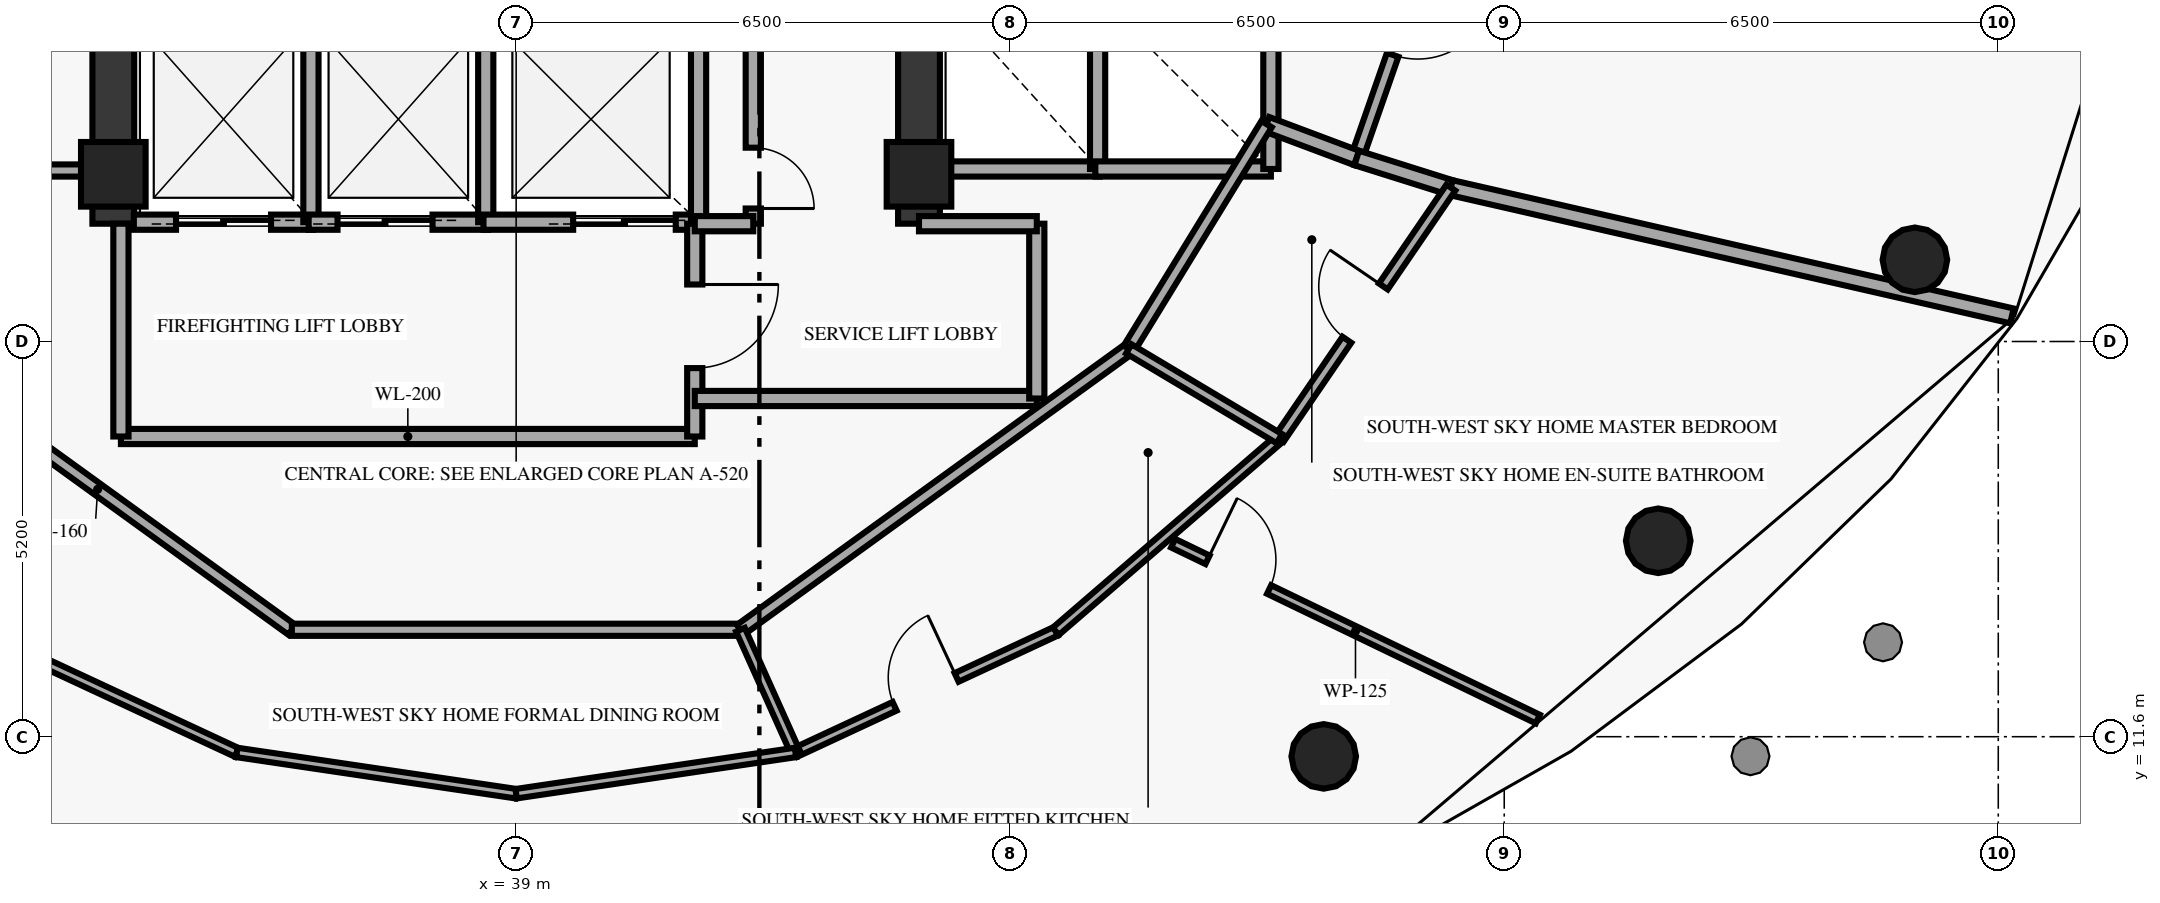
"""IFC4 building model, lengths in metres.
Left out: names, types, materials, properties, quantities, classifications, styles, units other than length and angle.
Written with IfcOpenShell. Run it as: python <this file> out.ifc"""

import sys

from ifc_helpers import new_model, si_unit, direction, frame, frame_2d, origin, origin_2d, place, context, subcontext, project, spatial, rectangle, circle, extrude, element, fill, save


model = new_model("IFC4")
c1 = context("Model", 3, precision=1e-05, world=origin(), true_north=direction((0.0, 1.0)))
c2 = subcontext(c1, "Body", "Model", "MODEL_VIEW")
j1 = project(units=[si_unit("LENGTHUNIT", "METRE"), si_unit("PLANEANGLEUNIT", "RADIAN")], contexts=[c1])
p1 = place(None, origin())
s1 = spatial("IfcSite", under=j1, at=p1, CompositionType="ELEMENT")
p2 = place(p1, origin())
s2 = spatial("IfcBuilding", under=s1, at=p2, CompositionType="ELEMENT")
p3 = place(p2, frame((0.0, 0.0, 208.15)))
s3 = spatial("IfcBuildingStorey", under=s2, at=p3, CompositionType="ELEMENT", Elevation=208.15)
for number, where, z_axis, x_axis in (
    (1, (33.7, 19.0, 0.0), (0.0, 0.0, 1.0), (1.0, 0.0, 0.0)),
    (2, (44.3, 19.0, 0.0), (0.0, 0.0, 1.0), (1.0, 0.0, 0.0)),
):
    element("IfcColumn", number, at=place(p3, frame(where, z_axis=z_axis, x_axis=x_axis)), inside=s3, PredefinedType="PILASTER", context=c2, shape_type="SweptSolid", body=[
        extrude(rectangle(XDim=0.85, YDim=0.85, at=origin_2d()), origin(), (0.0, 0.0, 1.0), 3.41),
    ])
for number, where, z_axis, x_axis in (
    (3, (49.625, 11.341, 0.0), (0.0, 0.0, 1.0), (1.0, 0.0, 0.0)),
    (4, (54.026, 14.178, 0.0), (0.0, 0.0, 1.0), (1.0, 0.0, 0.0)),
    (5, (57.403, 17.875, 0.0), (0.0, 0.0, 1.0), (1.0, 0.0, 0.0)),
):
    element("IfcColumn", number, at=place(p3, frame(where, z_axis=z_axis, x_axis=x_axis)), inside=s3, PredefinedType="COLUMN", context=c2, shape_type="SweptSolid", body=[
        extrude(circle(Radius=0.425, at=origin_2d()), origin(), (0.0, 0.0, 1.0), 3.41),
    ])
for number, where, z_axis, x_axis in (
    (6, (33.7, 18.35, 0.0), (0.0, 0.0, 1.0), (0.0, 1.0, 0.0)),
    (7, (44.3, 18.35, 0.0), (0.0, 0.0, 1.0), (0.0, 1.0, 0.0)),
):
    element("IfcWall", number, at=place(p3, frame(where, z_axis=z_axis, x_axis=x_axis)), inside=s3, PredefinedType="SHEAR", context=c2, shape_type="SweptSolid", body=[
        extrude(rectangle(XDim=2.95, YDim=0.55, at=frame_2d((1.475, 0.0))), origin(), (0.0, 0.0, 1.0), 3.41),
    ])
p4 = place(p3, frame((44.57, 19.07, 0.0), z_axis=(0.0, 0.0, 1.0), x_axis=(1.0, 0.0, 0.0)))
e8 = element("IfcWall", 8, at=p4, inside=s3, PredefinedType="SOLIDWALL", context=c2, shape_type="SweptSolid", body=[
    extrude(rectangle(XDim=2.11, YDim=0.2, at=frame_2d((1.055, 0.0))), origin(), (0.0, 0.0, 1.0), 3.41),
])
for number, where, z_axis, x_axis in (
    (9, (46.65, 19.07, 0.0), (0.0, 0.0, 1.0), (0.0, 1.0, 0.0)),
    (10, (46.62, 19.07, 0.0), (0.0, 0.0, 1.0), (1.0, 0.0, 0.0)),
    (11, (48.93, 19.07, 0.0), (0.0, 0.0, 1.0), (0.0, 1.0, 0.0)),
):
    element("IfcWall", number, at=place(p3, frame(where, z_axis=z_axis, x_axis=x_axis)), inside=s3, PredefinedType="SOLIDWALL", context=c2, shape_type="SweptSolid", body=[
        extrude(rectangle(XDim=2.31, YDim=0.2, at=frame_2d((1.155, 0.0))), origin(), (0.0, 0.0, 1.0), 3.41),
    ])
p5 = place(p3, frame((33.97, 18.37, 0.0), z_axis=(0.0, 0.0, 1.0), x_axis=(1.0, 0.0, 0.0)))
e12 = element("IfcWall", 12, at=p5, inside=s3, PredefinedType="SOLIDWALL", context=c2, shape_type="SweptSolid", body=[
    extrude(rectangle(XDim=2.36, YDim=0.2, at=frame_2d((1.18, 0.0))), origin(), (0.0, 0.0, 1.0), 3.41),
])
p6 = place(p5, frame((0.555, 0.0, 0.0)))
e13 = element("IfcOpeningElement", 13, at=p6, cuts=e12, PredefinedType="OPENING", context=c2, shape_type="SweptSolid", body=[
    extrude(rectangle(XDim=1.25, YDim=2.2, at=frame_2d((0.625, 1.1))), frame((0.0, 0.11, 0.0), z_axis=(0.0, -1.0, 0.0), x_axis=(1.0, 0.0, 0.0)), (0.0, 0.0, 1.0), 0.22),
])
p7 = place(p3, frame((36.3, 18.37, 0.0), z_axis=(0.0, 0.0, 1.0), x_axis=(0.0, 1.0, 0.0)))
e14 = element("IfcWall", 14, at=p7, inside=s3, PredefinedType="SOLIDWALL", context=c2, shape_type="SweptSolid", body=[
    extrude(rectangle(XDim=2.71, YDim=0.2, at=frame_2d((1.355, 0.0))), origin(), (0.0, 0.0, 1.0), 3.41),
])
p8 = place(p3, frame((36.27, 18.37, 0.0), z_axis=(0.0, 0.0, 1.0), x_axis=(1.0, 0.0, 0.0)))
e15 = element("IfcWall", 15, at=p8, inside=s3, PredefinedType="SOLIDWALL", context=c2, shape_type="SweptSolid", body=[
    extrude(rectangle(XDim=2.36, YDim=0.2, at=frame_2d((1.18, 0.0))), origin(), (0.0, 0.0, 1.0), 3.41),
])
p9 = place(p8, frame((0.38, 0.0, 0.0)))
e16 = element("IfcOpeningElement", 16, at=p9, cuts=e15, PredefinedType="OPENING", context=c2, shape_type="SweptSolid", body=[
    extrude(rectangle(XDim=1.25, YDim=2.2, at=frame_2d((0.625, 1.1))), frame((0.0, 0.11, 0.0), z_axis=(0.0, -1.0, 0.0), x_axis=(1.0, 0.0, 0.0)), (0.0, 0.0, 1.0), 0.22),
])
p10 = place(p3, frame((38.6, 18.37, 0.0), z_axis=(0.0, 0.0, 1.0), x_axis=(0.0, 1.0, 0.0)))
e17 = element("IfcWall", 17, at=p10, inside=s3, PredefinedType="SOLIDWALL", context=c2, shape_type="SweptSolid", body=[
    extrude(rectangle(XDim=2.71, YDim=0.2, at=frame_2d((1.355, 0.0))), origin(), (0.0, 0.0, 1.0), 3.41),
])
p11 = place(p3, frame((38.57, 18.37, 0.0), z_axis=(0.0, 0.0, 1.0), x_axis=(1.0, 0.0, 0.0)))
e18 = element("IfcWall", 18, at=p11, inside=s3, PredefinedType="SOLIDWALL", context=c2, shape_type="SweptSolid", body=[
    extrude(rectangle(XDim=2.83, YDim=0.2, at=frame_2d((1.415, 0.0))), origin(), (0.0, 0.0, 1.0), 3.41),
])
p12 = place(p11, frame((1.18, 0.0, 0.0)))
e19 = element("IfcOpeningElement", 19, at=p12, cuts=e18, PredefinedType="OPENING", context=c2, shape_type="SweptSolid", body=[
    extrude(rectangle(XDim=1.35, YDim=2.18, at=frame_2d((0.675, 1.09))), frame((0.0, 0.11, 0.0), z_axis=(0.0, -1.0, 0.0), x_axis=(1.0, 0.0, 0.0)), (0.0, 0.0, 1.0), 0.22),
])
p13 = place(p3, frame((41.4, 18.37, 0.0), z_axis=(0.0, 0.0, 1.0), x_axis=(0.0, 1.0, 0.0)))
e20 = element("IfcWall", 20, at=p13, inside=s3, PredefinedType="SOLIDWALL", context=c2, shape_type="SweptSolid", body=[
    extrude(rectangle(XDim=2.71, YDim=0.2, at=frame_2d((1.355, 0.0))), origin(), (0.0, 0.0, 1.0), 3.41),
])
p14 = place(p3, frame((29.05, 19.05, 0.0), z_axis=(0.0, 0.0, 1.0), x_axis=(1.0, 0.0, 0.0)))
e21 = element("IfcWall", 21, at=p14, inside=s3, PredefinedType="PARTITIONING", context=c2, shape_type="SweptSolid", body=[
    extrude(rectangle(XDim=4.65, YDim=0.16, at=frame_2d((2.325, 0.0))), origin(), (0.0, 0.0, 1.0), 3.41),
])
p15 = place(p3, frame((33.8, 15.55, 0.0), z_axis=(0.0, 0.0, 1.0), x_axis=(1.0, 0.0, 0.0)))
e22 = element("IfcWall", 22, at=p15, inside=s3, PredefinedType="SOLIDWALL", context=c2, shape_type="SweptSolid", body=[
    extrude(rectangle(XDim=7.55, YDim=0.2, at=frame_2d((3.775, 0.0))), origin(), (0.0, 0.0, 1.0), 3.41),
])
p16 = place(p3, frame((33.8, 15.55, 0.0), z_axis=(0.0, 0.0, 1.0), x_axis=(0.0, 1.0, 0.0)))
e23 = element("IfcWall", 23, at=p16, inside=s3, PredefinedType="SOLIDWALL", context=c2, shape_type="SweptSolid", body=[
    extrude(rectangle(XDim=2.8, YDim=0.2, at=frame_2d((1.4, 0.0))), origin(), (0.0, 0.0, 1.0), 3.41),
])
p17 = place(p3, frame((41.35, 15.55, 0.0), z_axis=(0.0, 0.0, 1.0), x_axis=(0.0, 1.0, 0.0)))
e24 = element("IfcWall", 24, at=p17, inside=s3, PredefinedType="SOLIDWALL", context=c2, shape_type="SweptSolid", body=[
    extrude(rectangle(XDim=2.8, YDim=0.2, at=frame_2d((1.4, 0.0))), origin(), (0.0, 0.0, 1.0), 3.41),
])
p18 = place(p17, frame((0.9, 0.0, 0.0)))
e25 = element("IfcOpeningElement", 25, at=p18, cuts=e24, PredefinedType="OPENING", context=c2, shape_type="SweptSolid", body=[
    extrude(rectangle(XDim=1.1, YDim=2.15, at=frame_2d((0.55, 1.075))), frame((0.0, 0.11, 0.0), z_axis=(0.0, -1.0, 0.0), x_axis=(1.0, 0.0, 0.0)), (0.0, 0.0, 1.0), 0.22),
])
p19 = place(p3, frame((41.35, 16.05, 0.0), z_axis=(0.0, 0.0, 1.0), x_axis=(1.0, 0.0, 0.0)))
e26 = element("IfcWall", 26, at=p19, inside=s3, PredefinedType="SOLIDWALL", context=c2, shape_type="SweptSolid", body=[
    extrude(rectangle(XDim=4.5, YDim=0.2, at=frame_2d((2.25, 0.0))), origin(), (0.0, 0.0, 1.0), 3.41),
])
p20 = place(p3, frame((45.85, 16.05, 0.0), z_axis=(0.0, 0.0, 1.0), x_axis=(0.0, 1.0, 0.0)))
e27 = element("IfcWall", 27, at=p20, inside=s3, PredefinedType="SOLIDWALL", context=c2, shape_type="SweptSolid", body=[
    extrude(rectangle(XDim=2.3, YDim=0.2, at=frame_2d((1.15, 0.0))), origin(), (0.0, 0.0, 1.0), 3.41),
])
p21 = place(p3, frame((44.3, 18.35, 0.0), z_axis=(0.0, 0.0, 1.0), x_axis=(1.0, 0.0, 0.0)))
e28 = element("IfcWall", 28, at=p21, inside=s3, PredefinedType="SOLIDWALL", context=c2, shape_type="SweptSolid", body=[
    extrude(rectangle(XDim=1.55, YDim=0.2, at=frame_2d((0.775, 0.0))), origin(), (0.0, 0.0, 1.0), 3.41),
])
p22 = place(p3, frame((42.12, 18.35, 0.0), z_axis=(0.0, 0.0, 1.0), x_axis=(0.0, 1.0, 0.0)))
e29 = element("IfcWall", 29, at=p22, inside=s3, PredefinedType="SOLIDWALL", context=c2, shape_type="SweptSolid", body=[
    extrude(rectangle(XDim=2.95, YDim=0.2, at=frame_2d((1.475, 0.0))), origin(), (0.0, 0.0, 1.0), 3.41),
])
p23 = place(p22, frame((0.2, 0.0, 0.0)))
e30 = element("IfcOpeningElement", 30, at=p23, cuts=e29, PredefinedType="OPENING", context=c2, shape_type="SweptSolid", body=[
    extrude(rectangle(XDim=0.8, YDim=2.05, at=frame_2d((0.4, 1.025))), frame((0.0, 0.11, 0.0), z_axis=(0.0, -1.0, 0.0), x_axis=(1.0, 0.0, 0.0)), (0.0, 0.0, 1.0), 0.22),
])
p24 = place(p3, frame((41.35, 18.35, 0.0), z_axis=(0.0, 0.0, 1.0), x_axis=(1.0, 0.0, 0.0)))
e31 = element("IfcWall", 31, at=p24, inside=s3, PredefinedType="SOLIDWALL", context=c2, shape_type="SweptSolid", body=[
    extrude(rectangle(XDim=0.77, YDim=0.2, at=frame_2d((0.385, 0.0))), origin(), (0.0, 0.0, 1.0), 3.41),
])
p25 = place(p3, frame((51.335, 22.874, 0.0), z_axis=(0.0, 0.0, 1.0), x_axis=(-0.32925850992, -0.944239817867, 0.0)))
e32 = element("IfcWall", 32, at=p25, inside=s3, PredefinedType="PARTITIONING", context=c2, shape_type="SweptSolid", body=[
    extrude(rectangle(XDim=3.875, YDim=0.16, at=frame_2d((1.938, 0.0))), origin(), (0.0, 0.0, 1.0), 3.41),
])
p26 = place(p25, frame((1.438, 0.0, 0.0)))
e33 = element("IfcOpeningElement", 33, at=p26, cuts=e32, PredefinedType="OPENING", context=c2, shape_type="SweptSolid", body=[
    extrude(rectangle(XDim=1.0, YDim=2.15, at=frame_2d((0.5, 1.075))), frame((0.0, 0.09, 0.0), z_axis=(0.0, -1.0, 0.0), x_axis=(1.0, 0.0, 0.0)), (0.0, 0.0, 1.0), 0.18),
])
p27 = place(p3, frame((48.873, 19.66, 0.0), z_axis=(0.0, 0.0, 1.0), x_axis=(0.93631333527, -0.351165684821, 0.0)))
e34 = element("IfcWall", 34, at=p27, inside=s3, PredefinedType="PARTITIONING", context=c2, shape_type="SweptSolid", body=[
    extrude(rectangle(XDim=1.267, YDim=0.2, at=frame_2d((0.633, 0.0))), origin(), (0.0, 0.0, 1.0), 3.41),
])
p28 = place(p3, frame((50.059, 19.215, 0.0), z_axis=(0.0, 0.0, 1.0), x_axis=(0.953832301714, -0.300339708008, 0.0)))
e35 = element("IfcWall", 35, at=p28, inside=s3, PredefinedType="PARTITIONING", context=c2, shape_type="SweptSolid", body=[
    extrude(rectangle(XDim=1.299, YDim=0.2, at=frame_2d((0.649, 0.0))), origin(), (0.0, 0.0, 1.0), 3.41),
])
p29 = place(p3, frame((51.298, 18.825, 0.0), z_axis=(0.0, 0.0, 1.0), x_axis=(0.97483809237, -0.222914094809, 0.0)))
e36 = element("IfcWall", 36, at=p29, inside=s3, PredefinedType="PARTITIONING", context=c2, shape_type="SweptSolid", body=[
    extrude(rectangle(XDim=7.572, YDim=0.2, at=frame_2d((3.786, 0.0))), origin(), (0.0, 0.0, 1.0), 3.41),
])
p30 = place(p3, frame((30.939, 16.703, 0.0), z_axis=(0.0, 0.0, 1.0), x_axis=(0.810290119061, -0.586028943784, 0.0)))
e37 = element("IfcWall", 37, at=p30, inside=s3, PredefinedType="PARTITIONING", context=c2, shape_type="SweptSolid", body=[
    extrude(rectangle(XDim=6.306, YDim=0.16, at=frame_2d((3.153, 0.0))), origin(), (0.0, 0.0, 1.0), 3.41),
])
p31 = place(p3, frame((36.049, 13.007, 0.0), z_axis=(0.0, 0.0, 1.0), x_axis=(1.0, 0.0, 0.0)))
e38 = element("IfcWall", 38, at=p31, inside=s3, PredefinedType="PARTITIONING", context=c2, shape_type="SweptSolid", body=[
    extrude(rectangle(XDim=5.902, YDim=0.16, at=frame_2d((2.951, 0.0))), origin(), (0.0, 0.0, 1.0), 3.41),
])
p32 = place(p3, frame((41.951, 13.007, 0.0), z_axis=(0.0, 0.0, 1.0), x_axis=(0.810290119061, 0.586028943784, 0.0)))
e39 = element("IfcWall", 39, at=p32, inside=s3, PredefinedType="PARTITIONING", context=c2, shape_type="SweptSolid", body=[
    extrude(rectangle(XDim=6.306, YDim=0.16, at=frame_2d((3.153, 0.0))), origin(), (0.0, 0.0, 1.0), 3.41),
])
p33 = place(p3, frame((47.061, 16.703, 0.0), z_axis=(0.0, 0.0, 1.0), x_axis=(0.522486120877, 0.852647789823, 0.0)))
e40 = element("IfcWall", 40, at=p33, inside=s3, PredefinedType="PARTITIONING", context=c2, shape_type="SweptSolid", body=[
    extrude(rectangle(XDim=3.468, YDim=0.16, at=frame_2d((1.734, 0.0))), origin(), (0.0, 0.0, 1.0), 3.41),
])
p34 = place(p3, frame((46.1, 12.987, 0.0), z_axis=(0.0, 0.0, 1.0), x_axis=(-0.906625113427, -0.421937085007, 0.0)))
e41 = element("IfcWall", 41, at=p34, inside=s3, PredefinedType="PARTITIONING", context=c2, shape_type="SweptSolid", body=[
    extrude(rectangle(XDim=3.778, YDim=0.125, at=frame_2d((1.889, 0.0))), origin(), (0.0, 0.0, 1.0), 3.41),
])
p35 = place(p34, frame((1.439, 0.0, 0.0)))
e42 = element("IfcOpeningElement", 42, at=p35, cuts=e41, PredefinedType="OPENING", context=c2, shape_type="SweptSolid", body=[
    extrude(rectangle(XDim=0.9, YDim=2.1, at=frame_2d((0.45, 1.05))), frame((0.0, 0.073, 0.0), z_axis=(0.0, -1.0, 0.0), x_axis=(1.0, 0.0, 0.0)), (0.0, 0.0, 1.0), 0.145),
])
p36 = place(p3, frame((46.1, 12.987, 0.0), z_axis=(0.0, 0.0, 1.0), x_axis=(0.757456069071, 0.652886133585, 0.0)))
e43 = element("IfcWall", 43, at=p36, inside=s3, PredefinedType="PARTITIONING", context=c2, shape_type="SweptSolid", body=[
    extrude(rectangle(XDim=3.883, YDim=0.125, at=frame_2d((1.941, 0.0))), origin(), (0.0, 0.0, 1.0), 3.41),
])
p37 = place(p3, frame((51.298, 18.825, 0.0), z_axis=(0.0, 0.0, 1.0), x_axis=(-0.56419813198, -0.825639429697, 0.0)))
e44 = element("IfcWall", 44, at=p37, inside=s3, PredefinedType="PARTITIONING", context=c2, shape_type="SweptSolid", body=[
    extrude(rectangle(XDim=4.0, YDim=0.14, at=frame_2d((2.0, 0.0))), origin(), (0.0, 0.0, 1.0), 3.41),
])
p38 = place(p37, frame((1.575, 0.0, 0.0)))
e45 = element("IfcOpeningElement", 45, at=p38, cuts=e44, PredefinedType="OPENING", context=c2, shape_type="SweptSolid", body=[
    extrude(rectangle(XDim=0.85, YDim=2.1, at=frame_2d((0.425, 1.05))), frame((0.0, 0.08, 0.0), z_axis=(0.0, -1.0, 0.0), x_axis=(1.0, 0.0, 0.0)), (0.0, 0.0, 1.0), 0.16),
])
p39 = place(p3, frame((41.951, 13.007, 0.0), z_axis=(0.0, 0.0, 1.0), x_axis=(0.409337233456, -0.912383159263, 0.0)))
e46 = element("IfcWall", 46, at=p39, inside=s3, PredefinedType="PARTITIONING", context=c2, shape_type="SweptSolid", body=[
    extrude(rectangle(XDim=1.769, YDim=0.125, at=frame_2d((0.885, 0.0))), origin(), (0.0, 0.0, 1.0), 3.41),
])
p40 = place(p3, frame((47.061, 16.703, 0.0), z_axis=(0.0, 0.0, 1.0), x_axis=(0.858844842863, -0.512235820583, 0.0)))
e47 = element("IfcWall", 47, at=p40, inside=s3, PredefinedType="PARTITIONING", context=c2, shape_type="SweptSolid", body=[
    extrude(rectangle(XDim=2.305, YDim=0.14, at=frame_2d((1.153, 0.0))), origin(), (0.0, 0.0, 1.0), 3.41),
])
p41 = place(p3, frame((31.9, 12.987, 0.0), z_axis=(0.0, 0.0, 1.0), x_axis=(0.906625113427, -0.421937085007, 0.0)))
e48 = element("IfcWall", 48, at=p41, inside=s3, PredefinedType="PARTITIONING", context=c2, shape_type="SweptSolid", body=[
    extrude(rectangle(XDim=3.778, YDim=0.125, at=frame_2d((1.889, 0.0))), origin(), (0.0, 0.0, 1.0), 3.41),
])
for number, where, z_axis, x_axis in (
    (49, (35.325, 11.393, 0.0), (0.0, 0.0, 1.0), (0.989, -0.146, 0.0)),
    (50, (39.0, 10.85, 0.0), (0.0, 0.0, 1.0), (0.989, 0.146, 0.0)),
):
    element("IfcWall", number, at=place(p3, frame(where, z_axis=z_axis, x_axis=x_axis)), inside=s3, PredefinedType="PARTITIONING", context=c2, shape_type="SweptSolid", body=[
        extrude(rectangle(XDim=3.715, YDim=0.125, at=frame_2d((1.857, 0.0))), origin(), (0.0, 0.0, 1.0), 3.41),
    ])
p42 = place(p3, frame((47.644, 14.146, 0.0), z_axis=(0.0, 0.0, 1.0), x_axis=(0.900716165112, -0.434408091437, 0.0)))
e51 = element("IfcWall", 51, at=p42, inside=s3, PredefinedType="PARTITIONING", context=c2, shape_type="SweptSolid", body=[
    extrude(rectangle(XDim=5.327, YDim=0.125, at=frame_2d((2.663, 0.0))), origin(), (0.0, 0.0, 1.0), 3.41),
])
p43 = place(p42, frame((0.502, 0.0, 0.0)))
e52 = element("IfcOpeningElement", 52, at=p43, cuts=e51, PredefinedType="OPENING", context=c2, shape_type="SweptSolid", body=[
    extrude(rectangle(XDim=0.9, YDim=2.1, at=frame_2d((0.45, 1.05))), frame((0.0, 0.073, 0.0), z_axis=(0.0, -1.0, 0.0), x_axis=(1.0, 0.0, 0.0)), (0.0, 0.0, 1.0), 0.145),
])
p44 = place(p6, origin())
e53 = element("IfcDoor", 53, at=p44, inside=s3, OperationType="DOUBLE_DOOR_SLIDING", PredefinedType="DOOR", context=c2, shape_type="SweptSolid", body=[
    extrude(rectangle(XDim=1.25, YDim=2.2, at=frame_2d((0.625, 1.1))), frame((0.0, 0.025, 0.0), z_axis=(0.0, -1.0, 0.0), x_axis=(1.0, 0.0, 0.0)), (0.0, 0.0, 1.0), 0.05),
])
fill(e13, e53)
p45 = place(p9, origin())
e54 = element("IfcDoor", 54, at=p45, inside=s3, OperationType="DOUBLE_DOOR_SLIDING", PredefinedType="DOOR", context=c2, shape_type="SweptSolid", body=[
    extrude(rectangle(XDim=1.25, YDim=2.2, at=frame_2d((0.625, 1.1))), frame((0.0, 0.025, 0.0), z_axis=(0.0, -1.0, 0.0), x_axis=(1.0, 0.0, 0.0)), (0.0, 0.0, 1.0), 0.05),
])
fill(e16, e54)
p46 = place(p12, origin())
e55 = element("IfcDoor", 55, at=p46, inside=s3, OperationType="DOUBLE_DOOR_SLIDING", PredefinedType="DOOR", context=c2, shape_type="SweptSolid", body=[
    extrude(rectangle(XDim=1.35, YDim=2.18, at=frame_2d((0.675, 1.09))), frame((0.0, 0.025, 0.0), z_axis=(0.0, -1.0, 0.0), x_axis=(1.0, 0.0, 0.0)), (0.0, 0.0, 1.0), 0.05),
])
fill(e19, e55)
p47 = place(p18, origin())
e56 = element("IfcDoor", 56, at=p47, inside=s3, OperationType="SINGLE_SWING_RIGHT", PredefinedType="DOOR", context=c2, shape_type="SweptSolid", body=[
    extrude(rectangle(XDim=1.1, YDim=2.15, at=frame_2d((0.55, 1.075))), frame((0.0, 0.025, 0.0), z_axis=(0.0, -1.0, 0.0), x_axis=(1.0, 0.0, 0.0)), (0.0, 0.0, 1.0), 0.05),
])
fill(e25, e56)
p48 = place(p23, origin())
e57 = element("IfcDoor", 57, at=p48, inside=s3, OperationType="SINGLE_SWING_LEFT", PredefinedType="DOOR", context=c2, shape_type="SweptSolid", body=[
    extrude(rectangle(XDim=0.8, YDim=2.05, at=frame_2d((0.4, 1.025))), frame((0.0, 0.025, 0.0), z_axis=(0.0, -1.0, 0.0), x_axis=(1.0, 0.0, 0.0)), (0.0, 0.0, 1.0), 0.05),
])
fill(e30, e57)
p49 = place(p26, origin())
e58 = element("IfcDoor", 58, at=p49, inside=s3, OperationType="SINGLE_SWING_LEFT", PredefinedType="DOOR", context=c2, shape_type="SweptSolid", body=[
    extrude(rectangle(XDim=1.0, YDim=2.15, at=frame_2d((0.5, 1.075))), frame((0.0, 0.025, 0.0), z_axis=(0.0, -1.0, 0.0), x_axis=(1.0, 0.0, 0.0)), (0.0, 0.0, 1.0), 0.05),
])
fill(e33, e58)
p50 = place(p35, origin())
e59 = element("IfcDoor", 59, at=p50, inside=s3, OperationType="SINGLE_SWING_LEFT", PredefinedType="DOOR", context=c2, shape_type="SweptSolid", body=[
    extrude(rectangle(XDim=0.9, YDim=2.1, at=frame_2d((0.45, 1.05))), frame((0.0, 0.025, 0.0), z_axis=(0.0, -1.0, 0.0), x_axis=(1.0, 0.0, 0.0)), (0.0, 0.0, 1.0), 0.05),
])
fill(e42, e59)
p51 = place(p38, origin())
e60 = element("IfcDoor", 60, at=p51, inside=s3, OperationType="SINGLE_SWING_LEFT", PredefinedType="DOOR", context=c2, shape_type="SweptSolid", body=[
    extrude(rectangle(XDim=0.85, YDim=2.1, at=frame_2d((0.425, 1.05))), frame((0.0, 0.025, 0.0), z_axis=(0.0, -1.0, 0.0), x_axis=(1.0, 0.0, 0.0)), (0.0, 0.0, 1.0), 0.05),
])
fill(e45, e60)
p52 = place(p43, origin())
e61 = element("IfcDoor", 61, at=p52, inside=s3, OperationType="SINGLE_SWING_LEFT", PredefinedType="DOOR", context=c2, shape_type="SweptSolid", body=[
    extrude(rectangle(XDim=0.9, YDim=2.1, at=frame_2d((0.45, 1.05))), frame((0.0, 0.025, 0.0), z_axis=(0.0, -1.0, 0.0), x_axis=(1.0, 0.0, 0.0)), (0.0, 0.0, 1.0), 0.05),
])
fill(e52, e61)
save(model, sys.argv[1])
